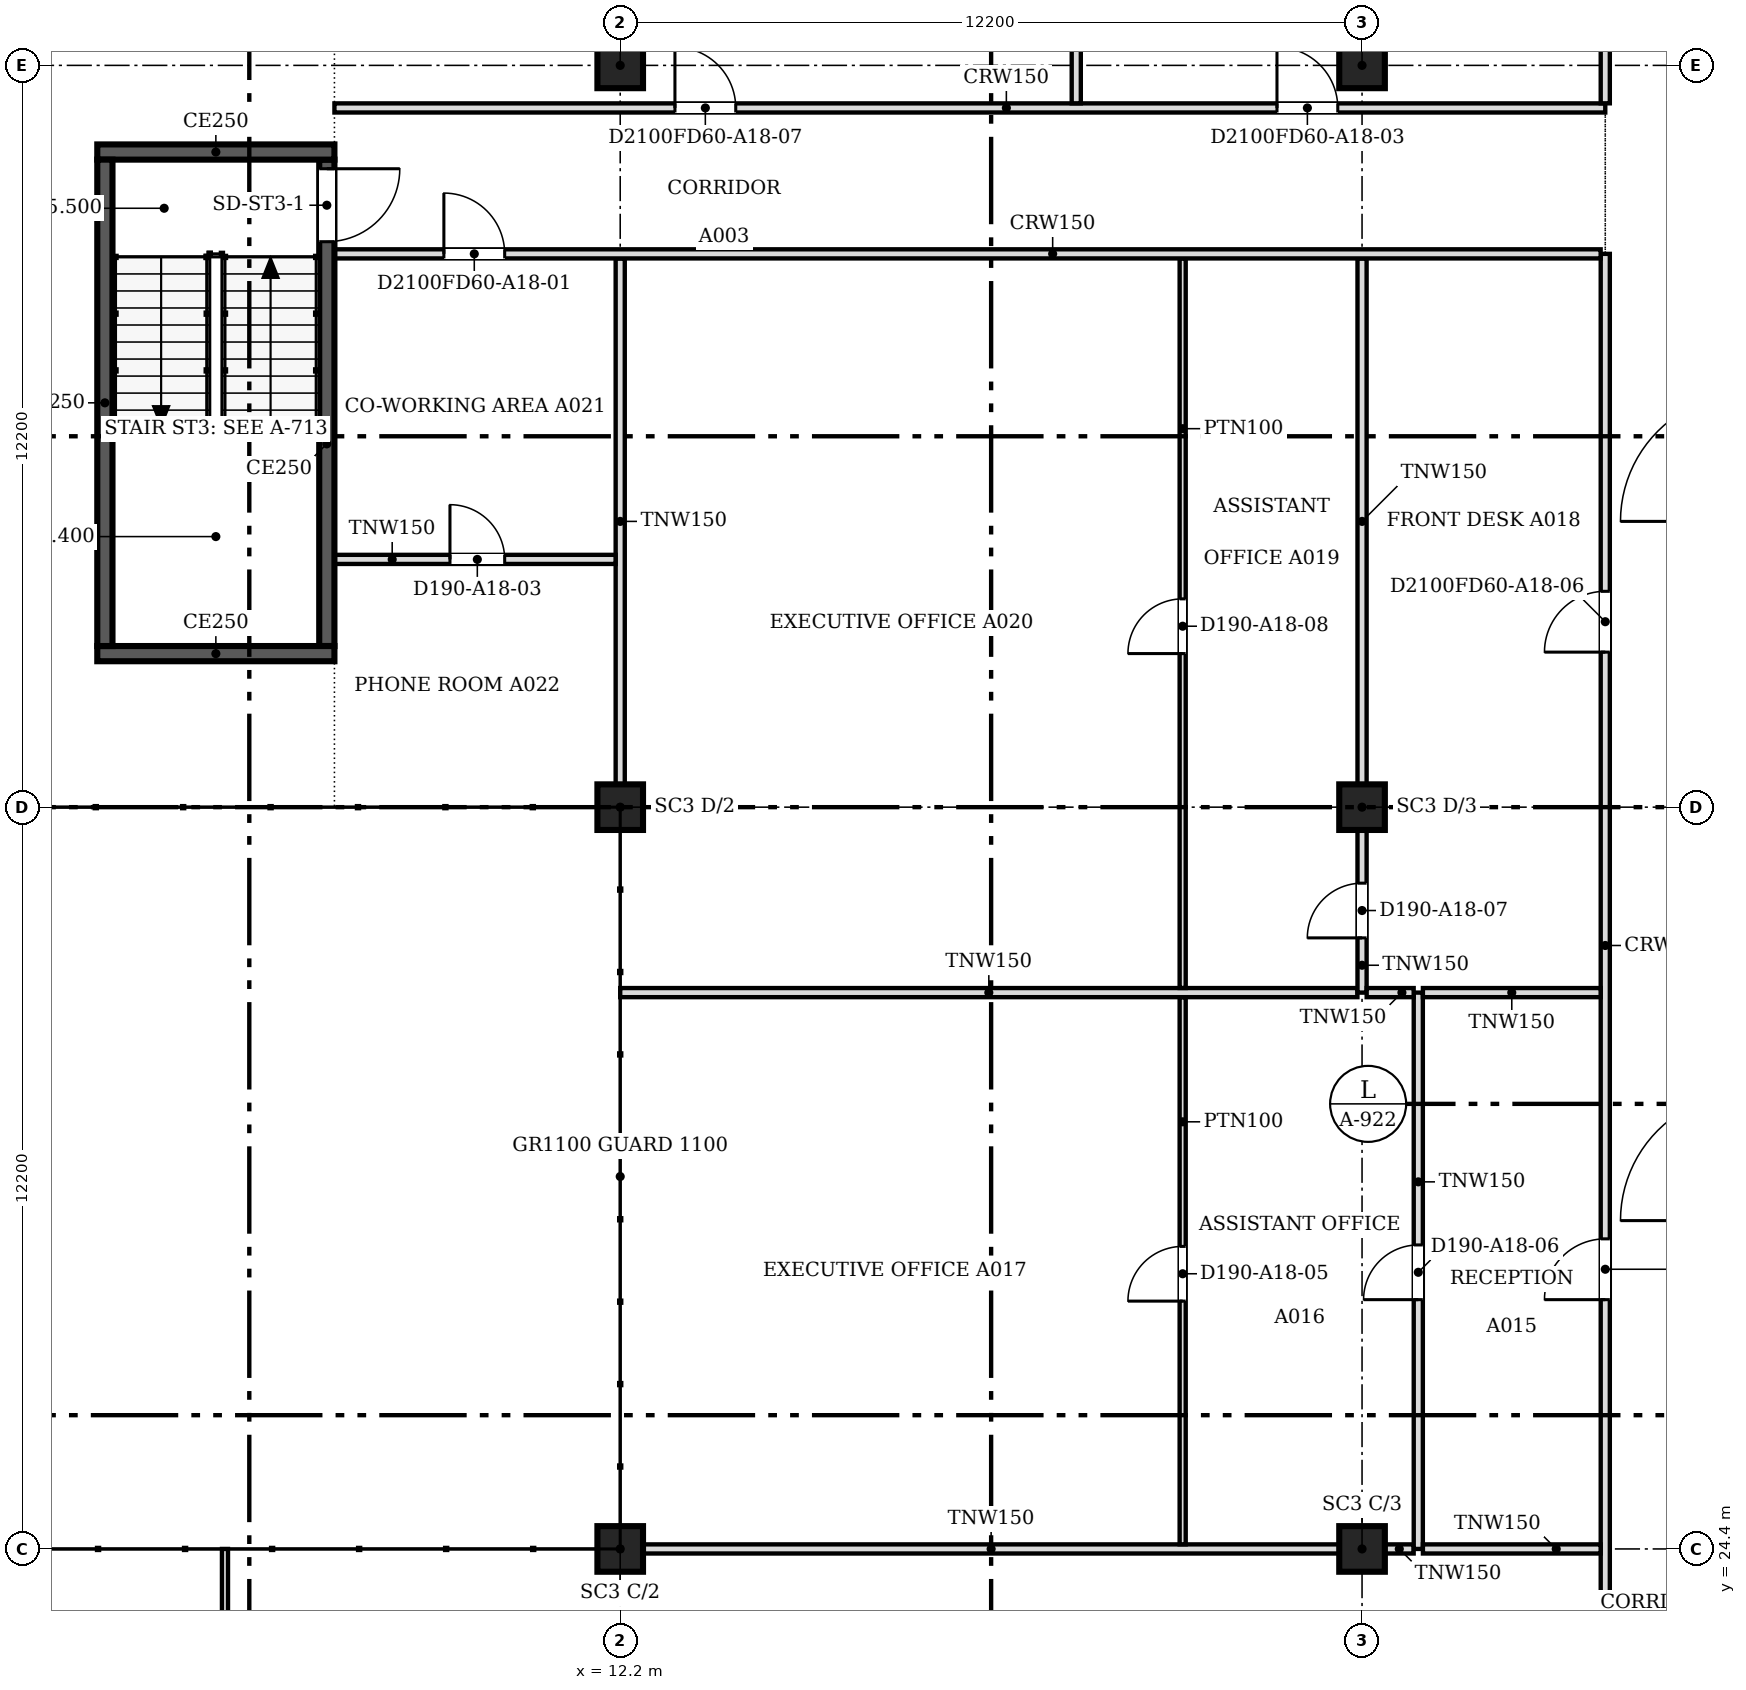
"""IFC4 building model, lengths in metres.
Left out: names, types, materials, properties, quantities, classifications, styles, units other than length and angle.
Written with IfcOpenShell. Run it as: python <this file> out.ifc"""

import sys

from ifc_helpers import new_model, si_unit, direction, frame, frame_2d, origin, origin_2d, place, context, subcontext, project, spatial, rectangle, extrude, source, transform, mapped, element, fill, save


model = new_model("IFC4")
c1 = context("Model", 3, precision=1e-05, world=origin(), true_north=direction((0.0, 1.0)))
c2 = subcontext(c1, "Body", "Model", "MODEL_VIEW")
j1 = project(units=[si_unit("LENGTHUNIT", "METRE"), si_unit("PLANEANGLEUNIT", "RADIAN")], contexts=[c1])
p1 = place(None, origin())
s1 = spatial("IfcSite", under=j1, at=p1, CompositionType="ELEMENT")
p2 = place(p1, origin())
s2 = spatial("IfcBuilding", under=s1, at=p2, CompositionType="ELEMENT")
p3 = place(p2, frame((0.0, 0.0, 197.9)))
s3 = spatial("IfcBuildingStorey", under=s2, at=p3, CompositionType="ELEMENT", Elevation=197.9)
for number, where, z_axis, x_axis in (
    (1, (12.2, 24.4, 0.0), (0.0, 0.0, 1.0), (1.0, 0.0, 0.0)),
    (2, (12.2, 36.6, 0.0), (0.0, 0.0, 1.0), (1.0, 0.0, 0.0)),
    (3, (12.2, 48.8, 0.0), (0.0, 0.0, 1.0), (1.0, 0.0, 0.0)),
    (4, (24.4, 24.4, 0.0), (0.0, 0.0, 1.0), (1.0, 0.0, 0.0)),
    (5, (24.4, 36.6, 0.0), (0.0, 0.0, 1.0), (1.0, 0.0, 0.0)),
    (6, (24.4, 48.8, 0.0), (0.0, 0.0, 1.0), (1.0, 0.0, 0.0)),
):
    element("IfcColumn", number, at=place(p3, frame(where, z_axis=z_axis, x_axis=x_axis)), inside=s3, PredefinedType="COLUMN", context=c2, shape_type="SweptSolid", body=[
        extrude(rectangle(XDim=0.75, YDim=0.75, at=origin_2d()), origin(), (0.0, 0.0, 1.0), 3.6),
    ])
p4 = place(p3, frame((7.5, 39.125, 0.0), z_axis=(0.0, 0.0, 1.0), x_axis=(-1.0, 0.0, 0.0)))
e7 = element("IfcWall", 7, at=p4, inside=s3, PredefinedType="SOLIDWALL", context=c2, shape_type="SweptSolid", body=[
    extrude(rectangle(XDim=3.9, YDim=0.25, at=frame_2d((1.95, 0.0))), origin(), (0.0, 0.0, 1.0), 3.8),
])
p5 = place(p3, frame((3.725, 39.25, 0.0), z_axis=(0.0, 0.0, 1.0), x_axis=(0.0, 1.0, 0.0)))
e8 = element("IfcWall", 8, at=p5, inside=s3, PredefinedType="SOLIDWALL", context=c2, shape_type="SweptSolid", body=[
    extrude(rectangle(XDim=8.0, YDim=0.25, at=frame_2d((4.0, 0.0))), origin(), (0.0, 0.0, 1.0), 3.8),
])
p6 = place(p3, frame((3.6, 47.375, 0.0), z_axis=(0.0, 0.0, 1.0), x_axis=(1.0, 0.0, 0.0)))
e9 = element("IfcWall", 9, at=p6, inside=s3, PredefinedType="SOLIDWALL", context=c2, shape_type="SweptSolid", body=[
    extrude(rectangle(XDim=3.9, YDim=0.25, at=frame_2d((1.95, 0.0))), origin(), (0.0, 0.0, 1.0), 3.8),
])
p7 = place(p3, frame((7.375, 47.25, 0.0), z_axis=(0.0, 0.0, 1.0), x_axis=(0.0, -1.0, 0.0)))
e10 = element("IfcWall", 10, at=p7, inside=s3, PredefinedType="SOLIDWALL", context=c2, shape_type="SweptSolid", body=[
    extrude(rectangle(XDim=8.0, YDim=0.25, at=frame_2d((4.0, 0.0))), origin(), (0.0, 0.0, 1.0), 3.8),
])
m1 = source(origin(), c2, "Body", "SweptSolid", [
    extrude(rectangle(XDim=1.2, YDim=2.1, at=frame_2d((0.6, 1.05))), frame((0.0, 0.135, 0.0), z_axis=(0.0, -1.0, 0.0), x_axis=(1.0, 0.0, 0.0)), (0.0, 0.0, 1.0), 0.27),
])
p8 = place(p7, frame((0.15, 0.0, 0.0)))
e11 = element("IfcOpeningElement", 11, at=p8, cuts=e10, PredefinedType="OPENING", context=c2, shape_type="MappedRepresentation", body=[
    mapped(m1, transform((0.0, 0.0, 0.0), scale=1.0)),
])
p9 = place(p3, frame((28.4, 18.8, 0.0), z_axis=(0.0, 0.0, 1.0), x_axis=(0.0, 1.0, 0.0)))
e12 = element("IfcWall", 12, at=p9, inside=s3, PredefinedType="PARTITIONING", context=c2, shape_type="SweptSolid", body=[
    extrude(rectangle(XDim=26.9, YDim=0.15, at=frame_2d((13.45, 0.0))), origin(), (0.0, 0.0, 1.0), 3.067),
])
m2 = source(origin(), c2, "Body", "SweptSolid", [
    extrude(rectangle(XDim=0.9, YDim=2.1, at=frame_2d((0.45, 1.05))), frame((0.0, 0.085, 0.0), z_axis=(0.0, -1.0, 0.0), x_axis=(1.0, 0.0, 0.0)), (0.0, 0.0, 1.0), 0.17),
])
p10 = place(p9, frame((1.3, 0.0, 0.0)))
e13 = element("IfcOpeningElement", 13, at=p10, cuts=e12, PredefinedType="OPENING", context=c2, shape_type="MappedRepresentation", body=[
    mapped(m2, transform((0.0, 0.0, 0.0), scale=1.0)),
])
m3 = source(origin(), c2, "Body", "SweptSolid", [
    extrude(rectangle(XDim=1.0, YDim=2.1, at=frame_2d((0.5, 1.05))), frame((0.0, 0.085, 0.0), z_axis=(0.0, -1.0, 0.0), x_axis=(1.0, 0.0, 0.0)), (0.0, 0.0, 1.0), 0.17),
])
p11 = place(p9, frame((9.7, 0.0, 0.0)))
e14 = element("IfcOpeningElement", 14, at=p11, cuts=e12, PredefinedType="OPENING", context=c2, shape_type="MappedRepresentation", body=[
    mapped(m3, transform((0.0, 0.0, 0.0), scale=1.0)),
])
p12 = place(p9, frame((20.35, 0.0, 0.0)))
e15 = element("IfcOpeningElement", 15, at=p12, cuts=e12, PredefinedType="OPENING", context=c2, shape_type="MappedRepresentation", body=[
    mapped(m3, transform((0.0, 0.0, 0.0), scale=1.0)),
])
p13 = place(p3, frame((5.7, 18.99, 0.0), z_axis=(0.0, 0.0, 1.0), x_axis=(0.0, 1.0, 0.0)))
e16 = element("IfcWall", 16, at=p13, inside=s3, PredefinedType="PARTITIONING", context=c2, shape_type="SweptSolid", body=[
    extrude(rectangle(XDim=5.41, YDim=0.1, at=frame_2d((2.705, 0.0))), origin(), (0.0, 0.0, 1.0), 3.067),
])
m4 = source(origin(), c2, "Body", "SweptSolid", [
    extrude(rectangle(XDim=0.9, YDim=2.1, at=frame_2d((0.45, 1.05))), frame((0.0, 0.06, 0.0), z_axis=(0.0, -1.0, 0.0), x_axis=(1.0, 0.0, 0.0)), (0.0, 0.0, 1.0), 0.12),
])
p14 = place(p13, frame((2.3, 0.0, 0.0)))
e17 = element("IfcOpeningElement", 17, at=p14, cuts=e16, PredefinedType="OPENING", context=c2, shape_type="MappedRepresentation", body=[
    mapped(m4, transform((0.0, 0.0, 0.0), scale=1.0)),
])
p15 = place(p3, frame((12.576, 24.4, 0.0), z_axis=(0.0, 0.0, 1.0), x_axis=(1.0, 0.0, 0.0)))
e18 = element("IfcWall", 18, at=p15, inside=s3, PredefinedType="PARTITIONING", context=c2, shape_type="SweptSolid", body=[
    extrude(rectangle(XDim=11.448, YDim=0.15, at=frame_2d((5.724, 0.0))), origin(), (0.0, 0.0, 1.0), 3.067),
])
p16 = place(p3, frame((24.776, 24.4, 0.0), z_axis=(0.0, 0.0, 1.0), x_axis=(1.0, 0.0, 0.0)))
e19 = element("IfcWall", 19, at=p16, inside=s3, PredefinedType="PARTITIONING", context=c2, shape_type="SweptSolid", body=[
    extrude(rectangle(XDim=0.473, YDim=0.15, at=frame_2d((0.237, 0.0))), origin(), (0.0, 0.0, 1.0), 3.067),
])
p17 = place(p3, frame((25.325, 24.4, 0.0), z_axis=(0.0, 0.0, 1.0), x_axis=(0.0, 1.0, 0.0)))
e20 = element("IfcWall", 20, at=p17, inside=s3, PredefinedType="PARTITIONING", context=c2, shape_type="SweptSolid", body=[
    extrude(rectangle(XDim=9.15, YDim=0.15, at=frame_2d((4.575, 0.0))), origin(), (0.0, 0.0, 1.0), 3.067),
])
p18 = place(p17, frame((4.1, 0.0, 0.0)))
e21 = element("IfcOpeningElement", 21, at=p18, cuts=e20, PredefinedType="OPENING", context=c2, shape_type="MappedRepresentation", body=[
    mapped(m2, transform((0.0, 0.0, 0.0), scale=1.0)),
])
p19 = place(p3, frame((25.401, 24.4, 0.0), z_axis=(0.0, 0.0, 1.0), x_axis=(1.0, 0.0, 0.0)))
e22 = element("IfcWall", 22, at=p19, inside=s3, PredefinedType="PARTITIONING", context=c2, shape_type="SweptSolid", body=[
    extrude(rectangle(XDim=2.923, YDim=0.15, at=frame_2d((1.461, 0.0))), origin(), (0.0, 0.0, 1.0), 3.067),
])
p20 = place(p3, frame((21.45, 24.476, 0.0), z_axis=(0.0, 0.0, 1.0), x_axis=(0.0, 1.0, 0.0)))
e23 = element("IfcWall", 23, at=p20, inside=s3, PredefinedType="PARTITIONING", context=c2, shape_type="SweptSolid", body=[
    extrude(rectangle(XDim=8.998, YDim=0.1, at=frame_2d((4.499, 0.0))), origin(), (0.0, 0.0, 1.0), 3.067),
])
p21 = place(p20, frame((4.0, 0.0, 0.0)))
e24 = element("IfcOpeningElement", 24, at=p21, cuts=e23, PredefinedType="OPENING", context=c2, shape_type="MappedRepresentation", body=[
    mapped(m4, transform((0.0, 0.0, 0.0), scale=1.0)),
])
p22 = place(p3, frame((12.2, 33.55, 0.0), z_axis=(0.0, 0.0, 1.0), x_axis=(1.0, 0.0, 0.0)))
e25 = element("IfcWall", 25, at=p22, inside=s3, PredefinedType="PARTITIONING", context=c2, shape_type="SweptSolid", body=[
    extrude(rectangle(XDim=12.124, YDim=0.15, at=frame_2d((6.062, 0.0))), origin(), (0.0, 0.0, 1.0), 3.067),
])
p23 = place(p3, frame((24.4, 33.55, 0.0), z_axis=(0.0, 0.0, 1.0), x_axis=(0.0, 1.0, 0.0)))
e26 = element("IfcWall", 26, at=p23, inside=s3, PredefinedType="PARTITIONING", context=c2, shape_type="SweptSolid", body=[
    extrude(rectangle(XDim=2.674, YDim=0.15, at=frame_2d((1.337, 0.0))), origin(), (0.0, 0.0, 1.0), 3.067),
])
p24 = place(p23, frame((0.9, 0.0, 0.0)))
e27 = element("IfcOpeningElement", 27, at=p24, cuts=e26, PredefinedType="OPENING", context=c2, shape_type="MappedRepresentation", body=[
    mapped(m2, transform((0.0, 0.0, 0.0), scale=1.0)),
])
p25 = place(p3, frame((24.476, 33.55, 0.0), z_axis=(0.0, 0.0, 1.0), x_axis=(1.0, 0.0, 0.0)))
e28 = element("IfcWall", 28, at=p25, inside=s3, PredefinedType="PARTITIONING", context=c2, shape_type="SweptSolid", body=[
    extrude(rectangle(XDim=0.773, YDim=0.15, at=frame_2d((0.386, 0.0))), origin(), (0.0, 0.0, 1.0), 3.067),
])
p26 = place(p3, frame((25.401, 33.55, 0.0), z_axis=(0.0, 0.0, 1.0), x_axis=(1.0, 0.0, 0.0)))
e29 = element("IfcWall", 29, at=p26, inside=s3, PredefinedType="PARTITIONING", context=c2, shape_type="SweptSolid", body=[
    extrude(rectangle(XDim=2.923, YDim=0.15, at=frame_2d((1.461, 0.0))), origin(), (0.0, 0.0, 1.0), 3.067),
])
p27 = place(p3, frame((21.45, 33.626, 0.0), z_axis=(0.0, 0.0, 1.0), x_axis=(0.0, 1.0, 0.0)))
e30 = element("IfcWall", 30, at=p27, inside=s3, PredefinedType="PARTITIONING", context=c2, shape_type="SweptSolid", body=[
    extrude(rectangle(XDim=11.998, YDim=0.1, at=frame_2d((5.999, 0.0))), origin(), (0.0, 0.0, 1.0), 3.067),
])
p28 = place(p27, frame((5.5, 0.0, 0.0)))
e31 = element("IfcOpeningElement", 31, at=p28, cuts=e30, PredefinedType="OPENING", context=c2, shape_type="MappedRepresentation", body=[
    mapped(m4, transform((0.0, 0.0, 0.0), scale=1.0)),
])
for number, where, z_axis, x_axis in (
    (32, (12.2, 36.976, 0.0), (0.0, 0.0, 1.0), (0.0, 1.0, 0.0)),
    (33, (24.4, 36.976, 0.0), (0.0, 0.0, 1.0), (0.0, 1.0, 0.0)),
):
    element("IfcWall", number, at=place(p3, frame(where, z_axis=z_axis, x_axis=x_axis)), inside=s3, PredefinedType="PARTITIONING", context=c2, shape_type="SweptSolid", body=[
        extrude(rectangle(XDim=8.648, YDim=0.15, at=frame_2d((4.324, 0.0))), origin(), (0.0, 0.0, 1.0), 3.067),
    ])
p29 = place(p3, frame((12.124, 40.675, 0.0), z_axis=(0.0, 0.0, 1.0), x_axis=(-1.0, 0.0, 0.0)))
e34 = element("IfcWall", 34, at=p29, inside=s3, PredefinedType="PARTITIONING", context=c2, shape_type="SweptSolid", body=[
    extrude(rectangle(XDim=4.624, YDim=0.15, at=frame_2d((2.312, 0.0))), origin(), (0.0, 0.0, 1.0), 3.067),
])
p30 = place(p29, frame((1.824, 0.0, 0.0)))
e35 = element("IfcOpeningElement", 35, at=p30, cuts=e34, PredefinedType="OPENING", context=c2, shape_type="MappedRepresentation", body=[
    mapped(m2, transform((0.0, 0.0, 0.0), scale=1.0)),
])
p31 = place(p3, frame((28.324, 45.7, 0.0), z_axis=(0.0, 0.0, 1.0), x_axis=(-1.0, 0.0, 0.0)))
e36 = element("IfcWall", 36, at=p31, inside=s3, PredefinedType="PARTITIONING", context=c2, shape_type="SweptSolid", body=[
    extrude(rectangle(XDim=20.824, YDim=0.15, at=frame_2d((10.412, 0.0))), origin(), (0.0, 0.0, 1.0), 3.067),
])
p32 = place(p31, frame((18.024, 0.0, 0.0)))
e37 = element("IfcOpeningElement", 37, at=p32, cuts=e36, PredefinedType="OPENING", context=c2, shape_type="MappedRepresentation", body=[
    mapped(m3, transform((0.0, 0.0, 0.0), scale=1.0)),
])
p33 = place(p3, frame((7.5, 48.1, 0.0), z_axis=(0.0, 0.0, 1.0), x_axis=(1.0, 0.0, 0.0)))
e38 = element("IfcWall", 38, at=p33, inside=s3, PredefinedType="PARTITIONING", context=c2, shape_type="SweptSolid", body=[
    extrude(rectangle(XDim=20.9, YDim=0.15, at=frame_2d((10.45, 0.0))), origin(), (0.0, 0.0, 1.0), 3.067),
])
p34 = place(p33, frame((15.501, 0.0, 0.0)))
e39 = element("IfcOpeningElement", 39, at=p34, cuts=e38, PredefinedType="OPENING", context=c2, shape_type="MappedRepresentation", body=[
    mapped(m3, transform((0.0, 0.0, 0.0), scale=1.0)),
])
p35 = place(p33, frame((5.6, 0.0, 0.0)))
e40 = element("IfcOpeningElement", 40, at=p35, cuts=e38, PredefinedType="OPENING", context=c2, shape_type="MappedRepresentation", body=[
    mapped(m3, transform((0.0, 0.0, 0.0), scale=1.0)),
])
p36 = place(p3, frame((19.7, 48.176, 0.0), z_axis=(0.0, 0.0, 1.0), x_axis=(0.0, 1.0, 0.0)))
e41 = element("IfcWall", 41, at=p36, inside=s3, PredefinedType="PARTITIONING", context=c2, shape_type="SweptSolid", body=[
    extrude(rectangle(XDim=6.224, YDim=0.15, at=frame_2d((3.112, 0.0))), origin(), (0.0, 0.0, 1.0), 3.067),
])
p37 = place(p3, frame((28.4, 48.176, 0.0), z_axis=(0.0, 0.0, 1.0), x_axis=(0.0, 1.0, 0.0)))
e42 = element("IfcWall", 42, at=p37, inside=s3, PredefinedType="PARTITIONING", context=c2, shape_type="SweptSolid", body=[
    extrude(rectangle(XDim=2.648, YDim=0.15, at=frame_2d((1.324, 0.0))), origin(), (0.0, 0.0, 1.0), 3.067),
])
m5 = source(origin(), c2, "Body", "SweptSolid", [
    extrude(rectangle(XDim=1.2, YDim=2.1, at=frame_2d((0.6, 1.05))), frame((0.0, 0.025, 0.0), z_axis=(0.0, -1.0, 0.0), x_axis=(1.0, 0.0, 0.0)), (0.0, 0.0, 1.0), 0.05),
])
p38 = place(p8, origin())
e43 = element("IfcDoor", 43, at=p38, inside=s3, OperationType="SINGLE_SWING_LEFT", PredefinedType="DOOR", context=c2, shape_type="MappedRepresentation", body=[
    mapped(m5, transform((0.0, 0.0, 0.0), scale=1.0)),
])
fill(e11, e43)
m6 = source(origin(), c2, "Body", "SweptSolid", [
    extrude(rectangle(XDim=0.9, YDim=2.1, at=frame_2d((0.45, 1.05))), frame((0.0, 0.025, 0.0), z_axis=(0.0, -1.0, 0.0), x_axis=(1.0, 0.0, 0.0)), (0.0, 0.0, 1.0), 0.05),
])
p39 = place(p30, origin())
e44 = element("IfcDoor", 44, at=p39, inside=s3, OperationType="SINGLE_SWING_RIGHT", PredefinedType="DOOR", context=c2, shape_type="MappedRepresentation", body=[
    mapped(m6, transform((0.0, 0.0, 0.0), scale=1.0)),
])
fill(e35, e44)
m7 = source(origin(), c2, "Body", "SweptSolid", [
    extrude(rectangle(XDim=1.0, YDim=2.1, at=frame_2d((0.5, 1.05))), frame((0.0, 0.025, 0.0), z_axis=(0.0, -1.0, 0.0), x_axis=(1.0, 0.0, 0.0)), (0.0, 0.0, 1.0), 0.05),
])
p40 = place(p32, origin())
e45 = element("IfcDoor", 45, at=p40, inside=s3, OperationType="SINGLE_SWING_RIGHT", PredefinedType="DOOR", context=c2, shape_type="MappedRepresentation", body=[
    mapped(m7, transform((0.0, 0.0, 0.0), scale=1.0)),
])
fill(e37, e45)
p41 = place(p34, origin())
e46 = element("IfcDoor", 46, at=p41, inside=s3, OperationType="SINGLE_SWING_LEFT", PredefinedType="DOOR", context=c2, shape_type="MappedRepresentation", body=[
    mapped(m7, transform((0.0, 0.0, 0.0), scale=1.0)),
])
fill(e39, e46)
p42 = place(p21, origin())
e47 = element("IfcDoor", 47, at=p42, inside=s3, OperationType="SINGLE_SWING_LEFT", PredefinedType="DOOR", context=c2, shape_type="MappedRepresentation", body=[
    mapped(m6, transform((0.0, 0.0, 0.0), scale=1.0)),
])
fill(e24, e47)
p43 = place(p11, origin())
e48 = element("IfcDoor", 48, at=p43, inside=s3, OperationType="SINGLE_SWING_LEFT", PredefinedType="DOOR", context=c2, shape_type="MappedRepresentation", body=[
    mapped(m7, transform((0.0, 0.0, 0.0), scale=1.0)),
])
fill(e14, e48)
p44 = place(p18, origin())
e49 = element("IfcDoor", 49, at=p44, inside=s3, OperationType="SINGLE_SWING_LEFT", PredefinedType="DOOR", context=c2, shape_type="MappedRepresentation", body=[
    mapped(m6, transform((0.0, 0.0, 0.0), scale=1.0)),
])
fill(e21, e49)
p45 = place(p24, origin())
e50 = element("IfcDoor", 50, at=p45, inside=s3, OperationType="SINGLE_SWING_LEFT", PredefinedType="DOOR", context=c2, shape_type="MappedRepresentation", body=[
    mapped(m6, transform((0.0, 0.0, 0.0), scale=1.0)),
])
fill(e27, e50)
p46 = place(p28, origin())
e51 = element("IfcDoor", 51, at=p46, inside=s3, OperationType="SINGLE_SWING_LEFT", PredefinedType="DOOR", context=c2, shape_type="MappedRepresentation", body=[
    mapped(m6, transform((0.0, 0.0, 0.0), scale=1.0)),
])
fill(e31, e51)
p47 = place(p12, origin())
e52 = element("IfcDoor", 52, at=p47, inside=s3, OperationType="SINGLE_SWING_LEFT", PredefinedType="DOOR", context=c2, shape_type="MappedRepresentation", body=[
    mapped(m7, transform((0.0, 0.0, 0.0), scale=1.0)),
])
fill(e15, e52)
p48 = place(p35, origin())
e53 = element("IfcDoor", 53, at=p48, inside=s3, OperationType="SINGLE_SWING_LEFT", PredefinedType="DOOR", context=c2, shape_type="MappedRepresentation", body=[
    mapped(m7, transform((0.0, 0.0, 0.0), scale=1.0)),
])
fill(e40, e53)
save(model, sys.argv[1])
